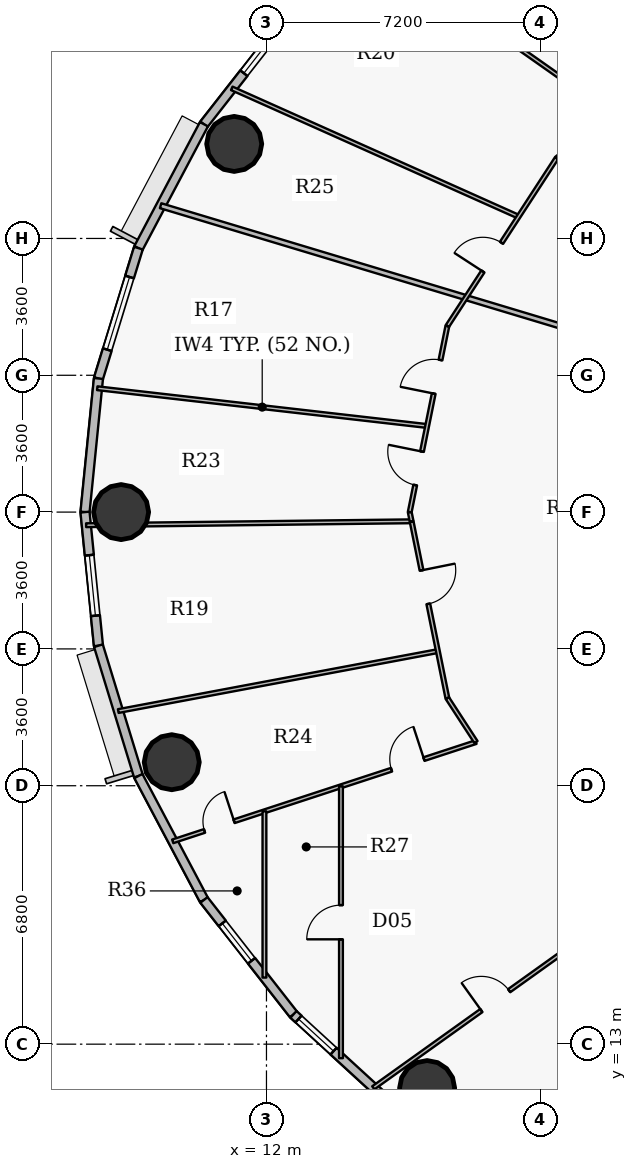
"""IFC4 building model, lengths in metres.
Left out: names, types, materials, properties, quantities, classifications, styles, units other than length and angle.
Written with IfcOpenShell. Run it as: python <this file> out.ifc"""

import sys

from ifc_helpers import new_model, si_unit, direction, frame, frame_2d, origin, origin_2d, place, context, subcontext, project, spatial, rectangle, hollow_circle, extrude, source, transform, mapped, element, fill, save


model = new_model("IFC4")
c1 = context("Model", 3, precision=1e-05, world=origin(), true_north=direction((0.0, 1.0)))
c2 = subcontext(c1, "Body", "Model", "MODEL_VIEW")
j1 = project(units=[si_unit("LENGTHUNIT", "METRE"), si_unit("PLANEANGLEUNIT", "RADIAN")], contexts=[c1])
p1 = place(None, origin())
s1 = spatial("IfcSite", under=j1, at=p1, CompositionType="ELEMENT")
p2 = place(p1, origin())
s2 = spatial("IfcBuilding", under=s1, at=p2, CompositionType="ELEMENT")
p3 = place(p2, frame((0.0, 0.0, 108.45)))
s3 = spatial("IfcBuildingStorey", under=s2, at=p3, CompositionType="ELEMENT", Elevation=108.45)
for number, where, z_axis, x_axis in (
    (1, (11.151, 36.688, 0.0), (0.0, 0.0, 1.0), (1.0, 0.0, 0.0)),
    (2, (8.175, 27.0, 0.0), (0.0, 0.0, 1.0), (1.0, 0.0, 0.0)),
    (3, (9.507, 20.419, 0.0), (0.0, 0.0, 1.0), (1.0, 0.0, 0.0)),
    (4, (16.227, 11.844, 0.0), (0.0, 0.0, 1.0), (1.0, 0.0, 0.0)),
):
    element("IfcColumn", number, at=place(p3, frame(where, z_axis=z_axis, x_axis=x_axis)), inside=s3, PredefinedType="COLUMN", context=c2, shape_type="SweptSolid", body=[
        extrude(hollow_circle(Radius=0.725, WallThickness=0.042, at=origin_2d()), origin(), (0.0, 0.0, 1.0), 3.75),
    ])
p4 = place(p3, frame((10.355, 37.206, 0.0), z_axis=(0.0, 0.0, 1.0), x_axis=(0.616272103517, 0.787533297345, 0.0)))
e5 = element("IfcWall", 5, at=p4, inside=s3, PredefinedType="SOLIDWALL", context=c2, shape_type="SweptSolid", body=[
    extrude(rectangle(XDim=3.823, YDim=0.24, at=frame_2d((1.912, 0.0))), origin(), (0.0, 0.0, 1.0), 3.5),
])
p5 = place(p4, frame((1.705, 0.0, 0.9)))
e6 = element("IfcOpeningElement", 6, at=p5, cuts=e5, PredefinedType="OPENING", context=c2, shape_type="SweptSolid", body=[
    extrude(rectangle(XDim=1.25, YDim=1.65, at=origin_2d()), frame((0.625, 0.13, 0.825), z_axis=(0.0, -1.0, 0.0), x_axis=(1.0, 0.0, 0.0)), (0.0, 0.0, 1.0), 0.26),
])
p6 = place(p3, frame((8.63, 33.945, 0.0), z_axis=(0.0, 0.0, 1.0), x_axis=(0.467614004126, 0.883932770716, 0.0)))
e7 = element("IfcWall", 7, at=p6, inside=s3, PredefinedType="SOLIDWALL", context=c2, shape_type="SweptSolid", body=[
    extrude(rectangle(XDim=3.689, YDim=0.24, at=frame_2d((1.844, 0.0))), origin(), (0.0, 0.0, 1.0), 3.5),
])
p7 = place(p3, frame((7.578, 30.515, 0.0), z_axis=(0.0, 0.0, 1.0), x_axis=(0.293124431344, 0.956074300329, 0.0)))
e8 = element("IfcWall", 8, at=p7, inside=s3, PredefinedType="SOLIDWALL", context=c2, shape_type="SweptSolid", body=[
    extrude(rectangle(XDim=3.587, YDim=0.24, at=frame_2d((1.793, 0.0))), origin(), (0.0, 0.0, 1.0), 3.5),
])
p8 = place(p7, frame((0.794, 0.0, 0.9)))
e9 = element("IfcOpeningElement", 9, at=p8, cuts=e8, PredefinedType="OPENING", context=c2, shape_type="SweptSolid", body=[
    extrude(rectangle(XDim=2.0, YDim=1.75, at=origin_2d()), frame((1.0, 0.13, 0.875), z_axis=(0.0, -1.0, 0.0), x_axis=(1.0, 0.0, 0.0)), (0.0, 0.0, 1.0), 0.26),
])
p9 = place(p3, frame((7.225, 27.0, 0.0), z_axis=(0.0, 0.0, 1.0), x_axis=(0.099989468229, 0.994988495533, 0.0)))
e10 = element("IfcWall", 10, at=p9, inside=s3, PredefinedType="SOLIDWALL", context=c2, shape_type="SweptSolid", body=[
    extrude(rectangle(XDim=3.533, YDim=0.24, at=frame_2d((1.767, 0.0))), origin(), (0.0, 0.0, 1.0), 3.5),
])
p10 = place(p3, frame((7.578, 23.485, 0.0), z_axis=(0.0, 0.0, 1.0), x_axis=(-0.099989468229, 0.994988495533, 0.0)))
e11 = element("IfcWall", 11, at=p10, inside=s3, PredefinedType="SOLIDWALL", context=c2, shape_type="SweptSolid", body=[
    extrude(rectangle(XDim=3.533, YDim=0.24, at=frame_2d((1.767, 0.0))), origin(), (0.0, 0.0, 1.0), 3.5),
])
p11 = place(p10, frame((0.794, 0.0, 0.9)))
e12 = element("IfcOpeningElement", 12, at=p11, cuts=e11, PredefinedType="OPENING", context=c2, shape_type="SweptSolid", body=[
    extrude(rectangle(XDim=1.6, YDim=1.75, at=origin_2d()), frame((0.8, 0.13, 0.875), z_axis=(0.0, -1.0, 0.0), x_axis=(1.0, 0.0, 0.0)), (0.0, 0.0, 1.0), 0.26),
])
p12 = place(p3, frame((8.63, 20.055, 0.0), z_axis=(0.0, 0.0, 1.0), x_axis=(-0.293124431344, 0.956074300329, 0.0)))
e13 = element("IfcWall", 13, at=p12, inside=s3, PredefinedType="SOLIDWALL", context=c2, shape_type="SweptSolid", body=[
    extrude(rectangle(XDim=3.587, YDim=0.24, at=frame_2d((1.793, 0.0))), origin(), (0.0, 0.0, 1.0), 3.5),
])
p13 = place(p3, frame((10.355, 16.794, 0.0), z_axis=(0.0, 0.0, 1.0), x_axis=(-0.467614004126, 0.883932770716, 0.0)))
e14 = element("IfcWall", 14, at=p13, inside=s3, PredefinedType="SOLIDWALL", context=c2, shape_type="SweptSolid", body=[
    extrude(rectangle(XDim=3.689, YDim=0.24, at=frame_2d((1.844, 0.0))), origin(), (0.0, 0.0, 1.0), 3.5),
])
p14 = place(p3, frame((12.711, 13.783, 0.0), z_axis=(0.0, 0.0, 1.0), x_axis=(-0.616272103517, 0.787533297345, 0.0)))
e15 = element("IfcWall", 15, at=p14, inside=s3, PredefinedType="SOLIDWALL", context=c2, shape_type="SweptSolid", body=[
    extrude(rectangle(XDim=3.823, YDim=0.24, at=frame_2d((1.912, 0.0))), origin(), (0.0, 0.0, 1.0), 3.5),
])
p15 = place(p14, frame((1.791, 0.0, 0.9)))
e16 = element("IfcOpeningElement", 16, at=p15, cuts=e15, PredefinedType="OPENING", context=c2, shape_type="SweptSolid", body=[
    extrude(rectangle(XDim=1.25, YDim=1.65, at=origin_2d()), frame((0.625, 0.13, 0.825), z_axis=(0.0, -1.0, 0.0), x_axis=(1.0, 0.0, 0.0)), (0.0, 0.0, 1.0), 0.26),
])
p16 = place(p3, frame((15.642, 11.097, 0.0), z_axis=(0.0, 0.0, 1.0), x_axis=(-0.737113356241, 0.675769117414, 0.0)))
e17 = element("IfcWall", 17, at=p16, inside=s3, PredefinedType="SOLIDWALL", context=c2, shape_type="SweptSolid", body=[
    extrude(rectangle(XDim=3.976, YDim=0.24, at=frame_2d((1.988, 0.0))), origin(), (0.0, 0.0, 1.0), 3.5),
])
p17 = place(p16, frame((2.546, 0.0, 0.9)))
e18 = element("IfcOpeningElement", 18, at=p17, cuts=e17, PredefinedType="OPENING", context=c2, shape_type="SweptSolid", body=[
    extrude(rectangle(XDim=1.25, YDim=1.65, at=origin_2d()), frame((0.625, 0.13, 0.825), z_axis=(0.0, -1.0, 0.0), x_axis=(1.0, 0.0, 0.0)), (0.0, 0.0, 1.0), 0.26),
])
p18 = place(p3, frame((7.255, 26.655, 0.0), z_axis=(0.0, 0.0, 1.0), x_axis=(0.999927994094, 0.012000276098, 0.0)))
e19 = element("IfcWall", 19, at=p18, inside=s3, PredefinedType="PARTITIONING", context=c2, shape_type="SweptSolid", body=[
    extrude(rectangle(XDim=8.565, YDim=0.1, at=frame_2d((4.283, 0.0))), origin(), (0.0, 0.0, 1.0), 2.935),
])
p19 = place(p3, frame((7.548, 30.259, 0.0), z_axis=(0.0, 0.0, 1.0), x_axis=(0.993502465776, -0.11381059044, 0.0)))
e20 = element("IfcWall", 20, at=p19, inside=s3, PredefinedType="PARTITIONING", context=c2, shape_type="SweptSolid", body=[
    extrude(rectangle(XDim=8.737, YDim=0.1, at=frame_2d((4.369, 0.0))), origin(), (0.0, 0.0, 1.0), 2.935),
])
p20 = place(p3, frame((8.1, 21.765, 0.0), z_axis=(0.0, 0.0, 1.0), x_axis=(0.982848598081, 0.184414297849, 0.0)))
e21 = element("IfcWall", 21, at=p20, inside=s3, PredefinedType="PARTITIONING", context=c2, shape_type="SweptSolid", body=[
    extrude(rectangle(XDim=8.556, YDim=0.1, at=frame_2d((4.278, 0.0))), origin(), (0.0, 0.0, 1.0), 2.935),
])
p21 = place(p3, frame((9.215, 35.062, 0.0), z_axis=(0.0, 0.0, 1.0), x_axis=(0.957569176287, -0.288203526393, 0.0)))
e22 = element("IfcWall", 22, at=p21, inside=s3, PredefinedType="PARTITIONING", context=c2, shape_type="SweptSolid", body=[
    extrude(rectangle(XDim=14.552, YDim=0.135, at=frame_2d((7.276, 0.0))), origin(), (0.0, 0.0, 1.0), 2.935),
])
p22 = place(p3, frame((9.533, 18.337, 0.0), z_axis=(0.0, 0.0, 1.0), x_axis=(0.950384937961, 0.311076308478, 0.0)))
e23 = element("IfcWall", 23, at=p22, inside=s3, PredefinedType="PARTITIONING", context=c2, shape_type="SweptSolid", body=[
    extrude(rectangle(XDim=8.396, YDim=0.1, at=frame_2d((4.198, 0.0))), origin(), (0.0, 0.0, 1.0), 2.935),
])
p23 = place(p22, frame((6.057, 0.0, 0.0)))
e24 = element("IfcOpeningElement", 24, at=p23, cuts=e23, PredefinedType="OPENING", context=c2, shape_type="SweptSolid", body=[
    extrude(rectangle(XDim=0.9, YDim=2.1, at=origin_2d()), frame((0.45, 0.06, 1.05), z_axis=(0.0, -1.0, 0.0), x_axis=(1.0, 0.0, 0.0)), (0.0, 0.0, 1.0), 0.12),
])
p24 = place(p22, frame((0.88, 0.0, 0.0)))
e25 = element("IfcOpeningElement", 25, at=p24, cuts=e23, PredefinedType="OPENING", context=c2, shape_type="SweptSolid", body=[
    extrude(rectangle(XDim=0.82, YDim=2.1, at=origin_2d()), frame((0.41, 0.06, 1.05), z_axis=(0.0, -1.0, 0.0), x_axis=(1.0, 0.0, 0.0)), (0.0, 0.0, 1.0), 0.12),
])
p25 = place(p3, frame((11.087, 38.15, 0.0), z_axis=(0.0, 0.0, 1.0), x_axis=(0.912756243594, -0.408504638627, 0.0)))
e26 = element("IfcWall", 26, at=p25, inside=s3, PredefinedType="PARTITIONING", context=c2, shape_type="SweptSolid", body=[
    extrude(rectangle(XDim=8.267, YDim=0.1, at=frame_2d((4.133, 0.0))), origin(), (0.0, 0.0, 1.0), 2.935),
])
p26 = place(p3, frame((11.947, 14.752, 0.0), z_axis=(0.0, 0.0, 1.0), x_axis=(0.0, 1.0, 0.0)))
e27 = element("IfcWall", 27, at=p26, inside=s3, PredefinedType="PARTITIONING", context=c2, shape_type="SweptSolid", body=[
    extrude(rectangle(XDim=4.374, YDim=0.1, at=frame_2d((2.187, 0.0))), origin(), (0.0, 0.0, 1.0), 2.935),
])
p27 = place(p3, frame((13.96, 12.631, 0.0), z_axis=(0.0, 0.0, 1.0), x_axis=(0.0, 1.0, 0.0)))
e28 = element("IfcWall", 28, at=p27, inside=s3, PredefinedType="PARTITIONING", context=c2, shape_type="SweptSolid", body=[
    extrude(rectangle(XDim=7.154, YDim=0.1, at=frame_2d((3.577, 0.0))), origin(), (0.0, 0.0, 1.0), 2.935),
])
p28 = place(p27, frame((3.127, 0.0, 0.0)))
e29 = element("IfcOpeningElement", 29, at=p28, cuts=e28, PredefinedType="OPENING", context=c2, shape_type="SweptSolid", body=[
    extrude(rectangle(XDim=0.9, YDim=2.1, at=origin_2d()), frame((0.45, 0.06, 1.05), z_axis=(0.0, -1.0, 0.0), x_axis=(1.0, 0.0, 0.0)), (0.0, 0.0, 1.0), 0.12),
])
p29 = place(p3, frame((14.661, 42.011, 0.0), z_axis=(0.0, 0.0, 1.0), x_axis=(0.817899711196, -0.575360810645, 0.0)))
e30 = element("IfcWall", 30, at=p29, inside=s3, PredefinedType="PARTITIONING", context=c2, shape_type="SweptSolid", body=[
    extrude(rectangle(XDim=7.891, YDim=0.1, at=frame_2d((3.945, 0.0))), origin(), (0.0, 0.0, 1.0), 2.935),
])
p30 = place(p29, frame((3.495, 0.0, 0.0)))
e31 = element("IfcOpeningElement", 31, at=p30, cuts=e30, PredefinedType="OPENING", context=c2, shape_type="SweptSolid", body=[
    extrude(rectangle(XDim=0.9, YDim=2.1, at=origin_2d()), frame((0.45, 0.06, 1.05), z_axis=(0.0, -1.0, 0.0), x_axis=(1.0, 0.0, 0.0)), (0.0, 0.0, 1.0), 0.12),
])
p31 = place(p3, frame((14.811, 11.851, 0.0), z_axis=(0.0, 0.0, 1.0), x_axis=(0.813476205606, 0.581598197137, 0.0)))
e32 = element("IfcWall", 32, at=p31, inside=s3, PredefinedType="PARTITIONING", context=c2, shape_type="SweptSolid", body=[
    extrude(rectangle(XDim=7.889, YDim=0.1, at=frame_2d((3.945, 0.0))), origin(), (0.0, 0.0, 1.0), 2.935),
])
p32 = place(p31, frame((3.495, 0.0, 0.0)))
e33 = element("IfcOpeningElement", 33, at=p32, cuts=e32, PredefinedType="OPENING", context=c2, shape_type="SweptSolid", body=[
    extrude(rectangle(XDim=0.9, YDim=2.1, at=origin_2d()), frame((0.45, 0.06, 1.05), z_axis=(0.0, -1.0, 0.0), x_axis=(1.0, 0.0, 0.0)), (0.0, 0.0, 1.0), 0.12),
])
p33 = place(p3, frame((15.77, 27.0, 0.0), z_axis=(0.0, 0.0, 1.0), x_axis=(0.198585481658, -0.980083571169, 0.0)))
e34 = element("IfcWall", 34, at=p33, inside=s3, PredefinedType="PARTITIONING", context=c2, shape_type="SweptSolid", body=[
    extrude(rectangle(XDim=0.247, YDim=0.1, at=frame_2d((0.124, 0.0))), origin(), (0.0, 0.0, 1.0), 2.935),
])
p34 = place(p3, frame((15.77, 27.0, 0.0), z_axis=(0.0, 0.0, 1.0), x_axis=(0.19822142127, 0.980157267049, 0.0)))
e35 = element("IfcWall", 35, at=p34, inside=s3, PredefinedType="PARTITIONING", context=c2, shape_type="SweptSolid", body=[
    extrude(rectangle(XDim=4.994, YDim=0.1, at=frame_2d((2.497, 0.0))), origin(), (0.0, 0.0, 1.0), 2.935),
])
p35 = place(p34, frame((3.183, 0.0, 0.0)))
e36 = element("IfcOpeningElement", 36, at=p35, cuts=e35, PredefinedType="OPENING", context=c2, shape_type="SweptSolid", body=[
    extrude(rectangle(XDim=0.9, YDim=2.1, at=origin_2d()), frame((0.45, 0.06, 1.05), z_axis=(0.0, -1.0, 0.0), x_axis=(1.0, 0.0, 0.0)), (0.0, 0.0, 1.0), 0.12),
])
p36 = place(p34, frame((0.725, 0.0, 0.0)))
e37 = element("IfcOpeningElement", 37, at=p36, cuts=e35, PredefinedType="OPENING", context=c2, shape_type="SweptSolid", body=[
    extrude(rectangle(XDim=0.9, YDim=2.1, at=origin_2d()), frame((0.45, 0.06, 1.05), z_axis=(0.0, -1.0, 0.0), x_axis=(1.0, 0.0, 0.0)), (0.0, 0.0, 1.0), 0.12),
])
p37 = place(p3, frame((15.821, 26.748, 0.0), z_axis=(0.0, 0.0, 1.0), x_axis=(0.198216867743, -0.980158187918, 0.0)))
e38 = element("IfcWall", 38, at=p37, inside=s3, PredefinedType="PARTITIONING", context=c2, shape_type="SweptSolid", body=[
    extrude(rectangle(XDim=4.737, YDim=0.1, at=frame_2d((2.369, 0.0))), origin(), (0.0, 0.0, 1.0), 2.935),
])
p38 = place(p37, frame((1.307, 0.0, 0.0)))
e39 = element("IfcOpeningElement", 39, at=p38, cuts=e38, PredefinedType="OPENING", context=c2, shape_type="SweptSolid", body=[
    extrude(rectangle(XDim=0.9, YDim=2.1, at=origin_2d()), frame((0.45, 0.06, 1.05), z_axis=(0.0, -1.0, 0.0), x_axis=(1.0, 0.0, 0.0)), (0.0, 0.0, 1.0), 0.12),
])
p39 = place(p3, frame((16.76, 22.105, 0.0), z_axis=(0.0, 0.0, 1.0), x_axis=(0.54547956044, -0.83812412514, 0.0)))
e40 = element("IfcWall", 40, at=p39, inside=s3, PredefinedType="PARTITIONING", context=c2, shape_type="SweptSolid", body=[
    extrude(rectangle(XDim=1.38, YDim=0.1, at=frame_2d((0.69, 0.0))), origin(), (0.0, 0.0, 1.0), 2.935),
])
p40 = place(p3, frame((16.76, 31.895, 0.0), z_axis=(0.0, 0.0, 1.0), x_axis=(0.545405249109, 0.838172484781, 0.0)))
e41 = element("IfcWall", 41, at=p40, inside=s3, PredefinedType="PARTITIONING", context=c2, shape_type="SweptSolid", body=[
    extrude(rectangle(XDim=5.269, YDim=0.1, at=frame_2d((2.634, 0.0))), origin(), (0.0, 0.0, 1.0), 2.935),
])
p41 = place(p40, frame((1.713, 0.0, 0.0)))
e42 = element("IfcOpeningElement", 42, at=p41, cuts=e41, PredefinedType="OPENING", context=c2, shape_type="SweptSolid", body=[
    extrude(rectangle(XDim=0.9, YDim=2.1, at=origin_2d()), frame((0.45, 0.06, 1.05), z_axis=(0.0, -1.0, 0.0), x_axis=(1.0, 0.0, 0.0)), (0.0, 0.0, 1.0), 0.12),
])
p42 = place(p3, frame((19.634, 36.311, 0.0), z_axis=(0.0, 0.0, 1.0), x_axis=(0.787307829703, 0.616560119768, 0.0)))
e43 = element("IfcWall", 43, at=p42, inside=s3, PredefinedType="PARTITIONING", context=c2, shape_type="SweptSolid", body=[
    extrude(rectangle(XDim=1.882, YDim=0.1, at=frame_2d((0.941, 0.0))), origin(), (0.0, 0.0, 1.0), 3.5),
])
m1 = source(origin(), c2, "Body", "SweptSolid", [
    extrude(rectangle(XDim=1.25, YDim=1.65, at=origin_2d()), frame((0.625, 0.03, 0.825), z_axis=(0.0, -1.0, 0.0), x_axis=(1.0, 0.0, 0.0)), (0.0, 0.0, 1.0), 0.06),
])
p43 = place(p5, origin())
e44 = element("IfcWindow", 44, at=p43, inside=s3, PartitioningType="SINGLE_PANEL", PredefinedType="WINDOW", context=c2, shape_type="MappedRepresentation", body=[
    mapped(m1, transform((0.0, 0.0, 0.0), x_axis=(1.0, 0.0, 0.0), y_axis=(0.0, 1.0, 0.0), z_axis=(0.0, 0.0, 1.0), scale=1.0)),
])
fill(e6, e44)
m2 = source(origin(), c2, "Body", "SweptSolid", [
    extrude(rectangle(XDim=2.0, YDim=1.75, at=origin_2d()), frame((1.0, 0.03, 0.875), z_axis=(0.0, -1.0, 0.0), x_axis=(1.0, 0.0, 0.0)), (0.0, 0.0, 1.0), 0.06),
])
p44 = place(p8, origin())
e45 = element("IfcWindow", 45, at=p44, inside=s3, PartitioningType="DOUBLE_PANEL_VERTICAL", PredefinedType="WINDOW", context=c2, shape_type="MappedRepresentation", body=[
    mapped(m2, transform((0.0, 0.0, 0.0), x_axis=(1.0, 0.0, 0.0), y_axis=(0.0, 1.0, 0.0), z_axis=(0.0, 0.0, 1.0), scale=1.0)),
])
fill(e9, e45)
m3 = source(origin(), c2, "Body", "SweptSolid", [
    extrude(rectangle(XDim=1.6, YDim=1.75, at=origin_2d()), frame((0.8, 0.03, 0.875), z_axis=(0.0, -1.0, 0.0), x_axis=(1.0, 0.0, 0.0)), (0.0, 0.0, 1.0), 0.06),
])
p45 = place(p11, origin())
e46 = element("IfcWindow", 46, at=p45, inside=s3, PartitioningType="DOUBLE_PANEL_VERTICAL", PredefinedType="WINDOW", context=c2, shape_type="MappedRepresentation", body=[
    mapped(m3, transform((0.0, 0.0, 0.0), x_axis=(1.0, 0.0, 0.0), y_axis=(0.0, 1.0, 0.0), z_axis=(0.0, 0.0, 1.0), scale=1.0)),
])
fill(e12, e46)
p46 = place(p15, origin())
e47 = element("IfcWindow", 47, at=p46, inside=s3, PartitioningType="SINGLE_PANEL", PredefinedType="WINDOW", context=c2, shape_type="MappedRepresentation", body=[
    mapped(m1, transform((0.0, 0.0, 0.0), x_axis=(1.0, 0.0, 0.0), y_axis=(0.0, 1.0, 0.0), z_axis=(0.0, 0.0, 1.0), scale=1.0)),
])
fill(e16, e47)
p47 = place(p17, origin())
e48 = element("IfcWindow", 48, at=p47, inside=s3, PartitioningType="SINGLE_PANEL", PredefinedType="WINDOW", context=c2, shape_type="MappedRepresentation", body=[
    mapped(m1, transform((0.0, 0.0, 0.0), x_axis=(1.0, 0.0, 0.0), y_axis=(0.0, 1.0, 0.0), z_axis=(0.0, 0.0, 1.0), scale=1.0)),
])
fill(e18, e48)
m4 = source(origin(), c2, "Body", "SweptSolid", [
    extrude(rectangle(XDim=0.9, YDim=2.1, at=origin_2d()), frame((0.45, 0.025, 1.05), z_axis=(0.0, -1.0, 0.0), x_axis=(1.0, 0.0, 0.0)), (0.0, 0.0, 1.0), 0.05),
])
p48 = place(p41, origin())
e49 = element("IfcDoor", 49, at=p48, inside=s3, OperationType="SINGLE_SWING_LEFT", PredefinedType="DOOR", context=c2, shape_type="MappedRepresentation", body=[
    mapped(m4, transform((0.0, 0.0, 0.0), x_axis=(1.0, 0.0, 0.0), y_axis=(0.0, 1.0, 0.0), z_axis=(0.0, 0.0, 1.0), scale=1.0)),
])
fill(e42, e49)
p49 = place(p35, origin())
e50 = element("IfcDoor", 50, at=p49, inside=s3, OperationType="SINGLE_SWING_LEFT", PredefinedType="DOOR", context=c2, shape_type="MappedRepresentation", body=[
    mapped(m4, transform((0.0, 0.0, 0.0), x_axis=(1.0, 0.0, 0.0), y_axis=(0.0, 1.0, 0.0), z_axis=(0.0, 0.0, 1.0), scale=1.0)),
])
fill(e36, e50)
p50 = place(p36, origin())
e51 = element("IfcDoor", 51, at=p50, inside=s3, OperationType="SINGLE_SWING_RIGHT", PredefinedType="DOOR", context=c2, shape_type="MappedRepresentation", body=[
    mapped(m4, transform((0.0, 0.0, 0.0), x_axis=(1.0, 0.0, 0.0), y_axis=(0.0, 1.0, 0.0), z_axis=(0.0, 0.0, 1.0), scale=1.0)),
])
fill(e37, e51)
p51 = place(p38, origin())
e52 = element("IfcDoor", 52, at=p51, inside=s3, OperationType="SINGLE_SWING_LEFT", PredefinedType="DOOR", context=c2, shape_type="MappedRepresentation", body=[
    mapped(m4, transform((0.0, 0.0, 0.0), x_axis=(1.0, 0.0, 0.0), y_axis=(0.0, 1.0, 0.0), z_axis=(0.0, 0.0, 1.0), scale=1.0)),
])
fill(e39, e52)
p52 = place(p23, origin())
e53 = element("IfcDoor", 53, at=p52, inside=s3, OperationType="SINGLE_SWING_RIGHT", PredefinedType="DOOR", context=c2, shape_type="MappedRepresentation", body=[
    mapped(m4, transform((0.0, 0.0, 0.0), x_axis=(1.0, 0.0, 0.0), y_axis=(0.0, 1.0, 0.0), z_axis=(0.0, 0.0, 1.0), scale=1.0)),
])
fill(e24, e53)
p53 = place(p32, origin())
e54 = element("IfcDoor", 54, at=p53, inside=s3, OperationType="SINGLE_SWING_LEFT", PredefinedType="DOOR", context=c2, shape_type="MappedRepresentation", body=[
    mapped(m4, transform((0.0, 0.0, 0.0), x_axis=(1.0, 0.0, 0.0), y_axis=(0.0, 1.0, 0.0), z_axis=(0.0, 0.0, 1.0), scale=1.0)),
])
fill(e33, e54)
m5 = source(origin(), c2, "Body", "SweptSolid", [
    extrude(rectangle(XDim=0.82, YDim=2.1, at=origin_2d()), frame((0.41, 0.025, 1.05), z_axis=(0.0, -1.0, 0.0), x_axis=(1.0, 0.0, 0.0)), (0.0, 0.0, 1.0), 0.05),
])
p54 = place(p24, origin())
e55 = element("IfcDoor", 55, at=p54, inside=s3, OperationType="SINGLE_SWING_RIGHT", PredefinedType="DOOR", context=c2, shape_type="MappedRepresentation", body=[
    mapped(m5, transform((0.0, 0.0, 0.0), x_axis=(1.0, 0.0, 0.0), y_axis=(0.0, 1.0, 0.0), z_axis=(0.0, 0.0, 1.0), scale=1.0)),
])
fill(e25, e55)
p55 = place(p28, origin())
e56 = element("IfcDoor", 56, at=p55, inside=s3, OperationType="SINGLE_SWING_LEFT", PredefinedType="DOOR", context=c2, shape_type="MappedRepresentation", body=[
    mapped(m4, transform((0.0, 0.0, 0.0), x_axis=(1.0, 0.0, 0.0), y_axis=(0.0, 1.0, 0.0), z_axis=(0.0, 0.0, 1.0), scale=1.0)),
])
fill(e29, e56)
save(model, sys.argv[1])
